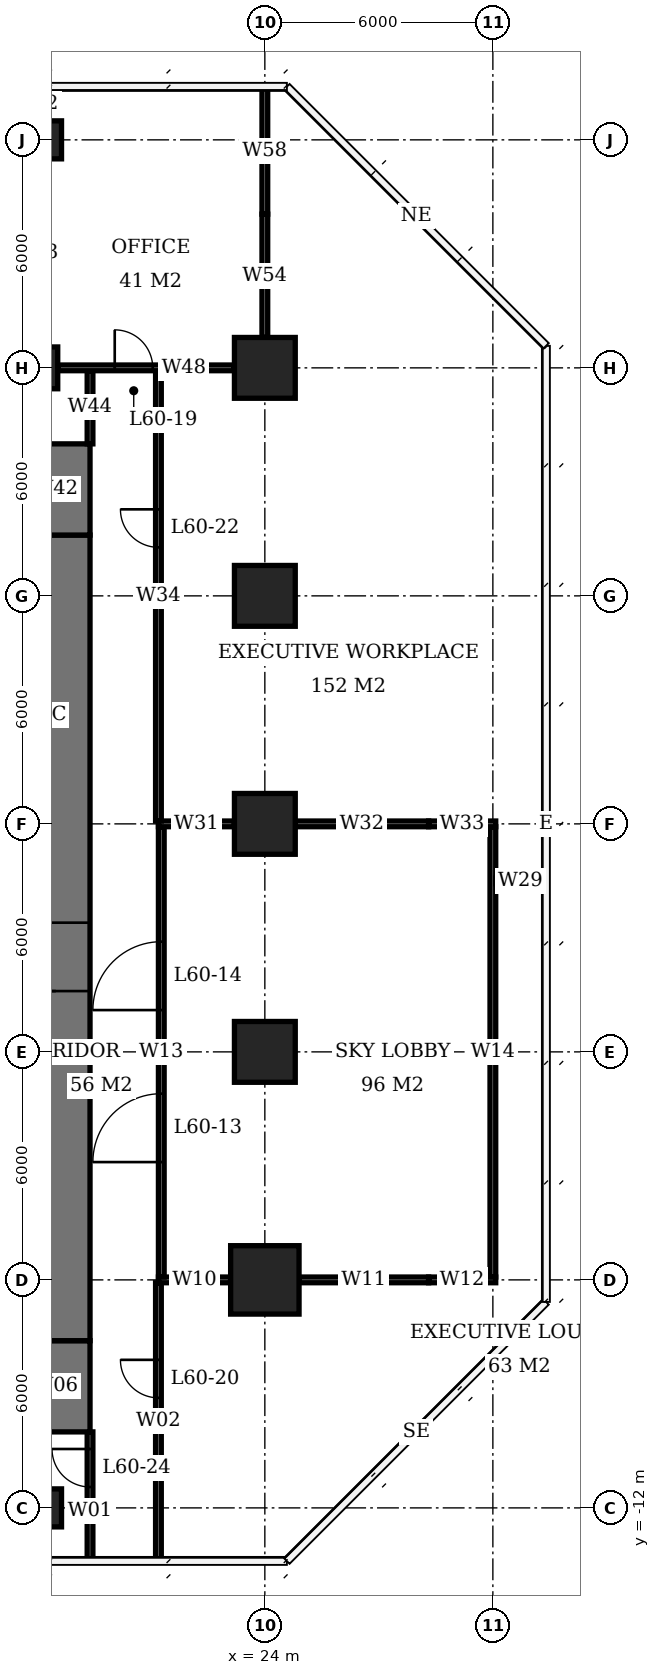
"""IFC4 building model, lengths in metres.
Left out: names, types, materials, properties, quantities, classifications, styles, units other than length and angle.
Written with IfcOpenShell. Run it as: python <this file> out.ifc"""

import sys

from ifc_helpers import new_model, si_unit, direction, frame, frame_2d, origin, origin_2d, place, context, subcontext, project, spatial, rectangle, extrude, element, fill, save


model = new_model("IFC4")
c1 = context("Model", 3, precision=1e-05, world=origin(), true_north=direction((0.0, 1.0)))
c2 = subcontext(c1, "Body", "Model", "MODEL_VIEW")
j1 = project(units=[si_unit("LENGTHUNIT", "METRE"), si_unit("PLANEANGLEUNIT", "RADIAN")], contexts=[c1])
p1 = place(None, origin())
s1 = spatial("IfcSite", under=j1, at=p1, CompositionType="ELEMENT")
p2 = place(p1, origin())
s2 = spatial("IfcBuilding", under=s1, at=p2, CompositionType="ELEMENT")
p3 = place(p2, frame((0.0, 0.0, 245.0)))
s3 = spatial("IfcBuildingStorey", under=s2, at=p3, CompositionType="ELEMENT", Elevation=245.0)
p4 = place(p3, frame((18.0, -12.0, 0.0), z_axis=(0.0, 0.0, 1.0), x_axis=(1.0, 0.0, 0.0)))
e1 = element("IfcColumn", 1, at=p4, inside=s3, PredefinedType="COLUMN", context=c2, shape_type="SweptSolid", body=[
    extrude(rectangle(XDim=1.3, YDim=1.0, at=origin_2d()), origin(), (0.0, 0.0, 1.0), 3.9),
])
p5 = place(p3, frame((18.0, 18.0, 0.0), z_axis=(0.0, 0.0, 1.0), x_axis=(1.0, 0.0, 0.0)))
e2 = element("IfcColumn", 2, at=p5, inside=s3, PredefinedType="COLUMN", context=c2, shape_type="SweptSolid", body=[
    extrude(rectangle(XDim=1.1, YDim=1.1, at=origin_2d()), origin(), (0.0, 0.0, 1.0), 3.9),
])
p6 = place(p3, frame((18.0, 24.0, 0.0), z_axis=(0.0, 0.0, 1.0), x_axis=(1.0, 0.0, 0.0)))
e3 = element("IfcColumn", 3, at=p6, inside=s3, PredefinedType="COLUMN", context=c2, shape_type="SweptSolid", body=[
    extrude(rectangle(XDim=1.3, YDim=1.0, at=origin_2d()), origin(), (0.0, 0.0, 1.0), 3.9),
])
p7 = place(p3, frame((24.0, -6.0, 0.0), z_axis=(0.0, 0.0, 1.0), x_axis=(1.0, 0.0, 0.0)))
e4 = element("IfcColumn", 4, at=p7, inside=s3, PredefinedType="COLUMN", context=c2, shape_type="SweptSolid", body=[
    extrude(rectangle(XDim=1.8, YDim=1.8, at=origin_2d()), origin(), (0.0, 0.0, 1.0), 3.9),
])
for number, where, z_axis, x_axis in (
    (5, (24.0, 0.0, 0.0), (0.0, 0.0, 1.0), (1.0, 0.0, 0.0)),
    (6, (24.0, 6.0, 0.0), (0.0, 0.0, 1.0), (1.0, 0.0, 0.0)),
    (7, (24.0, 12.0, 0.0), (0.0, 0.0, 1.0), (1.0, 0.0, 0.0)),
    (8, (24.0, 18.0, 0.0), (0.0, 0.0, 1.0), (1.0, 0.0, 0.0)),
):
    element("IfcColumn", number, at=place(p3, frame(where, z_axis=z_axis, x_axis=x_axis)), inside=s3, PredefinedType="COLUMN", context=c2, shape_type="SweptSolid", body=[
        extrude(rectangle(XDim=1.6, YDim=1.6, at=origin_2d()), origin(), (0.0, 0.0, 1.0), 3.9),
    ])
p8 = place(p3, frame((18.5, -7.6, 0.0), z_axis=(0.0, 0.0, 1.0), x_axis=(0.0, 1.0, 0.0)))
e9 = element("IfcWall", 9, at=p8, inside=s3, PredefinedType="SHEAR", context=c2, shape_type="SweptSolid", body=[
    extrude(rectangle(XDim=21.2, YDim=1.8, at=frame_2d((10.6, 0.0))), origin(), (0.0, 0.0, 1.0), 3.9),
])
p9 = place(p8, frame((9.2, 0.0, 0.0)))
e10 = element("IfcOpeningElement", 10, at=p9, cuts=e9, PredefinedType="OPENING", context=c2, shape_type="SweptSolid", body=[
    extrude(rectangle(XDim=1.8, YDim=2.4, at=frame_2d((0.9, 1.2))), frame((0.0, 0.91, 0.0), z_axis=(0.0, -1.0, 0.0), x_axis=(1.0, 0.0, 0.0)), (0.0, 0.0, 1.0), 1.82),
])
for number, where, z_axis, x_axis in (
    (11, (18.5, -10.0, 0.0), (0.0, 0.0, 1.0), (0.0, 1.0, 0.0)),
    (12, (18.5, 13.6, 0.0), (0.0, 0.0, 1.0), (0.0, 1.0, 0.0)),
):
    element("IfcWall", number, at=place(p3, frame(where, z_axis=z_axis, x_axis=x_axis)), inside=s3, PredefinedType="SHEAR", context=c2, shape_type="SweptSolid", body=[
        extrude(rectangle(XDim=2.4, YDim=1.8, at=frame_2d((1.2, 0.0))), origin(), (0.0, 0.0, 1.0), 3.9),
    ])
p10 = place(p3, frame((21.2, -6.0, 0.0), z_axis=(0.0, 0.0, 1.0), x_axis=(1.0, 0.0, 0.0)))
e13 = element("IfcWall", 13, at=p10, inside=s3, PredefinedType="PARTITIONING", context=c2, shape_type="SweptSolid", body=[
    extrude(rectangle(XDim=1.9, YDim=0.15, at=frame_2d((0.95, 0.0))), origin(), (0.0, 0.0, 1.0), 3.65),
])
p11 = place(p3, frame((24.9, -6.0, 0.0), z_axis=(0.0, 0.0, 1.0), x_axis=(1.0, 0.0, 0.0)))
e14 = element("IfcWall", 14, at=p11, inside=s3, PredefinedType="PARTITIONING", context=c2, shape_type="SweptSolid", body=[
    extrude(rectangle(XDim=3.41, YDim=0.15, at=frame_2d((1.705, 0.0))), origin(), (0.0, 0.0, 1.0), 2.65),
])
p12 = place(p3, frame((28.31, -6.0, 0.0), z_axis=(0.0, 0.0, 1.0), x_axis=(1.0, 0.0, 0.0)))
e15 = element("IfcWall", 15, at=p12, inside=s3, PredefinedType="PARTITIONING", context=c2, shape_type="SweptSolid", body=[
    extrude(rectangle(XDim=1.765, YDim=0.15, at=frame_2d((0.882, 0.0))), origin(), (0.0, 0.0, 1.0), 3.65),
])
p13 = place(p3, frame((21.2, 6.0, 0.0), z_axis=(0.0, 0.0, 1.0), x_axis=(1.0, 0.0, 0.0)))
e16 = element("IfcWall", 16, at=p13, inside=s3, PredefinedType="PARTITIONING", context=c2, shape_type="SweptSolid", body=[
    extrude(rectangle(XDim=2.0, YDim=0.15, at=frame_2d((1.0, 0.0))), origin(), (0.0, 0.0, 1.0), 3.65),
])
p14 = place(p3, frame((24.8, 6.0, 0.0), z_axis=(0.0, 0.0, 1.0), x_axis=(1.0, 0.0, 0.0)))
e17 = element("IfcWall", 17, at=p14, inside=s3, PredefinedType="PARTITIONING", context=c2, shape_type="SweptSolid", body=[
    extrude(rectangle(XDim=3.51, YDim=0.15, at=frame_2d((1.755, 0.0))), origin(), (0.0, 0.0, 1.0), 2.65),
])
p15 = place(p3, frame((28.31, 6.0, 0.0), z_axis=(0.0, 0.0, 1.0), x_axis=(1.0, 0.0, 0.0)))
e18 = element("IfcWall", 18, at=p15, inside=s3, PredefinedType="PARTITIONING", context=c2, shape_type="SweptSolid", body=[
    extrude(rectangle(XDim=1.765, YDim=0.15, at=frame_2d((0.882, 0.0))), origin(), (0.0, 0.0, 1.0), 3.65),
])
p16 = place(p3, frame((18.55, 18.0, 0.0), z_axis=(0.0, 0.0, 1.0), x_axis=(1.0, 0.0, 0.0)))
e19 = element("IfcWall", 19, at=p16, inside=s3, PredefinedType="PARTITIONING", context=c2, shape_type="SweptSolid", body=[
    extrude(rectangle(XDim=4.64, YDim=0.15, at=frame_2d((2.32, 0.0))), origin(), (0.0, 0.0, 1.0), 3.65),
])
p17 = place(p16, frame((1.5, 0.0, 0.0)))
e20 = element("IfcOpeningElement", 20, at=p17, cuts=e19, PredefinedType="OPENING", context=c2, shape_type="SweptSolid", body=[
    extrude(rectangle(XDim=1.0, YDim=2.4, at=frame_2d((0.5, 1.2))), frame((0.0, 0.085, 0.0), z_axis=(0.0, -1.0, 0.0), x_axis=(1.0, 0.0, 0.0)), (0.0, 0.0, 1.0), 0.17),
])
p18 = place(p3, frame((21.275, -5.925, 0.0), z_axis=(0.0, 0.0, 1.0), x_axis=(0.0, 1.0, 0.0)))
e21 = element("IfcWall", 21, at=p18, inside=s3, PredefinedType="PARTITIONING", context=c2, shape_type="SweptSolid", body=[
    extrude(rectangle(XDim=11.85, YDim=0.15, at=frame_2d((5.925, 0.0))), origin(), (0.0, 0.0, 1.0), 3.65),
])
p19 = place(p18, frame((3.025, 0.0, 0.0)))
e22 = element("IfcOpeningElement", 22, at=p19, cuts=e21, PredefinedType="OPENING", context=c2, shape_type="SweptSolid", body=[
    extrude(rectangle(XDim=1.8, YDim=2.4, at=frame_2d((0.9, 1.2))), frame((0.0, 0.085, 0.0), z_axis=(0.0, -1.0, 0.0), x_axis=(1.0, 0.0, 0.0)), (0.0, 0.0, 1.0), 0.17),
])
p20 = place(p18, frame((7.025, 0.0, 0.0)))
e23 = element("IfcOpeningElement", 23, at=p20, cuts=e21, PredefinedType="OPENING", context=c2, shape_type="SweptSolid", body=[
    extrude(rectangle(XDim=1.8, YDim=2.4, at=frame_2d((0.9, 1.2))), frame((0.0, 0.085, 0.0), z_axis=(0.0, -1.0, 0.0), x_axis=(1.0, 0.0, 0.0)), (0.0, 0.0, 1.0), 0.17),
])
p21 = place(p3, frame((24.0, 18.8, 0.0), z_axis=(0.0, 0.0, 1.0), x_axis=(0.0, 1.0, 0.0)))
e24 = element("IfcWall", 24, at=p21, inside=s3, PredefinedType="PARTITIONING", context=c2, shape_type="SweptSolid", body=[
    extrude(rectangle(XDim=3.245, YDim=0.15, at=frame_2d((1.623, 0.0))), origin(), (0.0, 0.0, 1.0), 2.65),
])
p22 = place(p3, frame((24.0, 22.045, 0.0), z_axis=(0.0, 0.0, 1.0), x_axis=(0.0, 1.0, 0.0)))
e25 = element("IfcWall", 25, at=p22, inside=s3, PredefinedType="PARTITIONING", context=c2, shape_type="SweptSolid", body=[
    extrude(rectangle(XDim=3.33, YDim=0.15, at=frame_2d((1.665, 0.0))), origin(), (0.0, 0.0, 1.0), 3.65),
])
p23 = place(p3, frame((30.0, -5.925, 0.0), z_axis=(0.0, 0.0, 1.0), x_axis=(0.0, 1.0, 0.0)))
e26 = element("IfcWall", 26, at=p23, inside=s3, PredefinedType="PARTITIONING", context=c2, shape_type="SweptSolid", body=[
    extrude(rectangle(XDim=11.85, YDim=0.15, at=frame_2d((5.925, 0.0))), origin(), (0.0, 0.0, 1.0), 3.65),
])
p24 = place(p3, frame((19.4, -13.375, 0.0), z_axis=(0.0, 0.0, 1.0), x_axis=(0.0, 1.0, 0.0)))
e27 = element("IfcWall", 27, at=p24, inside=s3, PredefinedType="PARTITIONING", context=c2, shape_type="SweptSolid", body=[
    extrude(rectangle(XDim=3.375, YDim=0.15, at=frame_2d((1.688, 0.0))), origin(), (0.0, 0.0, 1.0), 3.65),
])
p25 = place(p24, frame((1.925, 0.0, 0.0)))
e28 = element("IfcOpeningElement", 28, at=p25, cuts=e27, PredefinedType="OPENING", context=c2, shape_type="SweptSolid", body=[
    extrude(rectangle(XDim=1.0, YDim=2.1, at=frame_2d((0.5, 1.05))), frame((0.0, 0.085, 0.0), z_axis=(0.0, -1.0, 0.0), x_axis=(1.0, 0.0, 0.0)), (0.0, 0.0, 1.0), 0.17),
])
p26 = place(p3, frame((19.4, 16.0, 0.0), z_axis=(0.0, 0.0, 1.0), x_axis=(0.0, 1.0, 0.0)))
e29 = element("IfcWall", 29, at=p26, inside=s3, PredefinedType="PARTITIONING", context=c2, shape_type="SweptSolid", body=[
    extrude(rectangle(XDim=1.925, YDim=0.15, at=frame_2d((0.962, 0.0))), origin(), (0.0, 0.0, 1.0), 3.65),
])
p27 = place(p3, frame((21.2, -13.375, 0.0), z_axis=(0.0, 0.0, 1.0), x_axis=(0.0, 1.0, 0.0)))
e30 = element("IfcWall", 30, at=p27, inside=s3, PredefinedType="PARTITIONING", context=c2, shape_type="SweptSolid", body=[
    extrude(rectangle(XDim=7.3, YDim=0.15, at=frame_2d((3.65, 0.0))), origin(), (0.0, 0.0, 1.0), 3.65),
])
p28 = place(p27, frame((4.271, 0.0, 0.0)))
e31 = element("IfcOpeningElement", 31, at=p28, cuts=e30, PredefinedType="OPENING", context=c2, shape_type="SweptSolid", body=[
    extrude(rectangle(XDim=1.0, YDim=2.4, at=frame_2d((0.5, 1.2))), frame((0.0, 0.085, 0.0), z_axis=(0.0, -1.0, 0.0), x_axis=(1.0, 0.0, 0.0)), (0.0, 0.0, 1.0), 0.17),
])
p29 = place(p3, frame((21.2, 6.075, 0.0), z_axis=(0.0, 0.0, 1.0), x_axis=(0.0, 1.0, 0.0)))
e32 = element("IfcWall", 32, at=p29, inside=s3, PredefinedType="PARTITIONING", context=c2, shape_type="SweptSolid", body=[
    extrude(rectangle(XDim=11.85, YDim=0.15, at=frame_2d((5.925, 0.0))), origin(), (0.0, 0.0, 1.0), 3.65),
])
p30 = place(p29, frame((7.202, 0.0, 0.0)))
e33 = element("IfcOpeningElement", 33, at=p30, cuts=e32, PredefinedType="OPENING", context=c2, shape_type="SweptSolid", body=[
    extrude(rectangle(XDim=1.0, YDim=2.4, at=frame_2d((0.5, 1.2))), frame((0.0, 0.085, 0.0), z_axis=(0.0, -1.0, 0.0), x_axis=(1.0, 0.0, 0.0)), (0.0, 0.0, 1.0), 0.17),
])
p31 = place(p3, frame((30.075, 4.5, 0.0), z_axis=(0.0, 0.0, 1.0), x_axis=(1.0, 0.0, 0.0)))
e34 = element("IfcWall", 34, at=p31, inside=s3, PredefinedType="PARTITIONING", context=c2, shape_type="SweptSolid", body=[
    extrude(rectangle(XDim=1.3, YDim=0.15, at=frame_2d((0.65, 0.0))), origin(), (0.0, 0.0, 1.0), 3.65),
])
p32 = place(p9, origin())
e35 = element("IfcDoor", 35, at=p32, inside=s3, OperationType="DOUBLE_DOOR_SINGLE_SWING", PredefinedType="DOOR", context=c2, shape_type="SweptSolid", body=[
    extrude(rectangle(XDim=1.8, YDim=2.4, at=frame_2d((0.9, 1.2))), frame((0.0, 0.025, 0.0), z_axis=(0.0, -1.0, 0.0), x_axis=(1.0, 0.0, 0.0)), (0.0, 0.0, 1.0), 0.05),
])
fill(e10, e35)
p33 = place(p19, origin())
e36 = element("IfcDoor", 36, at=p33, inside=s3, OperationType="DOUBLE_DOOR_SINGLE_SWING", PredefinedType="DOOR", context=c2, shape_type="SweptSolid", body=[
    extrude(rectangle(XDim=1.8, YDim=2.4, at=frame_2d((0.9, 1.2))), frame((0.0, 0.025, 0.0), z_axis=(0.0, -1.0, 0.0), x_axis=(1.0, 0.0, 0.0)), (0.0, 0.0, 1.0), 0.05),
])
fill(e22, e36)
p34 = place(p20, origin())
e37 = element("IfcDoor", 37, at=p34, inside=s3, OperationType="DOUBLE_DOOR_SINGLE_SWING", PredefinedType="DOOR", context=c2, shape_type="SweptSolid", body=[
    extrude(rectangle(XDim=1.8, YDim=2.4, at=frame_2d((0.9, 1.2))), frame((0.0, 0.025, 0.0), z_axis=(0.0, -1.0, 0.0), x_axis=(1.0, 0.0, 0.0)), (0.0, 0.0, 1.0), 0.05),
])
fill(e23, e37)
p35 = place(p17, origin())
e38 = element("IfcDoor", 38, at=p35, inside=s3, OperationType="SINGLE_SWING_LEFT", PredefinedType="DOOR", context=c2, shape_type="SweptSolid", body=[
    extrude(rectangle(XDim=1.0, YDim=2.4, at=frame_2d((0.5, 1.2))), frame((0.0, 0.025, 0.0), z_axis=(0.0, -1.0, 0.0), x_axis=(1.0, 0.0, 0.0)), (0.0, 0.0, 1.0), 0.05),
])
fill(e20, e38)
p36 = place(p28, origin())
e39 = element("IfcDoor", 39, at=p36, inside=s3, OperationType="SINGLE_SWING_RIGHT", PredefinedType="DOOR", context=c2, shape_type="SweptSolid", body=[
    extrude(rectangle(XDim=1.0, YDim=2.4, at=frame_2d((0.5, 1.2))), frame((0.0, 0.025, 0.0), z_axis=(0.0, -1.0, 0.0), x_axis=(1.0, 0.0, 0.0)), (0.0, 0.0, 1.0), 0.05),
])
fill(e31, e39)
p37 = place(p30, origin())
e40 = element("IfcDoor", 40, at=p37, inside=s3, OperationType="SINGLE_SWING_RIGHT", PredefinedType="DOOR", context=c2, shape_type="SweptSolid", body=[
    extrude(rectangle(XDim=1.0, YDim=2.4, at=frame_2d((0.5, 1.2))), frame((0.0, 0.025, 0.0), z_axis=(0.0, -1.0, 0.0), x_axis=(1.0, 0.0, 0.0)), (0.0, 0.0, 1.0), 0.05),
])
fill(e33, e40)
p38 = place(p25, origin())
e41 = element("IfcDoor", 41, at=p38, inside=s3, OperationType="SINGLE_SWING_RIGHT", PredefinedType="DOOR", context=c2, shape_type="SweptSolid", body=[
    extrude(rectangle(XDim=1.0, YDim=2.1, at=frame_2d((0.5, 1.05))), frame((0.0, 0.025, 0.0), z_axis=(0.0, -1.0, 0.0), x_axis=(1.0, 0.0, 0.0)), (0.0, 0.0, 1.0), 0.05),
])
fill(e28, e41)
save(model, sys.argv[1])
